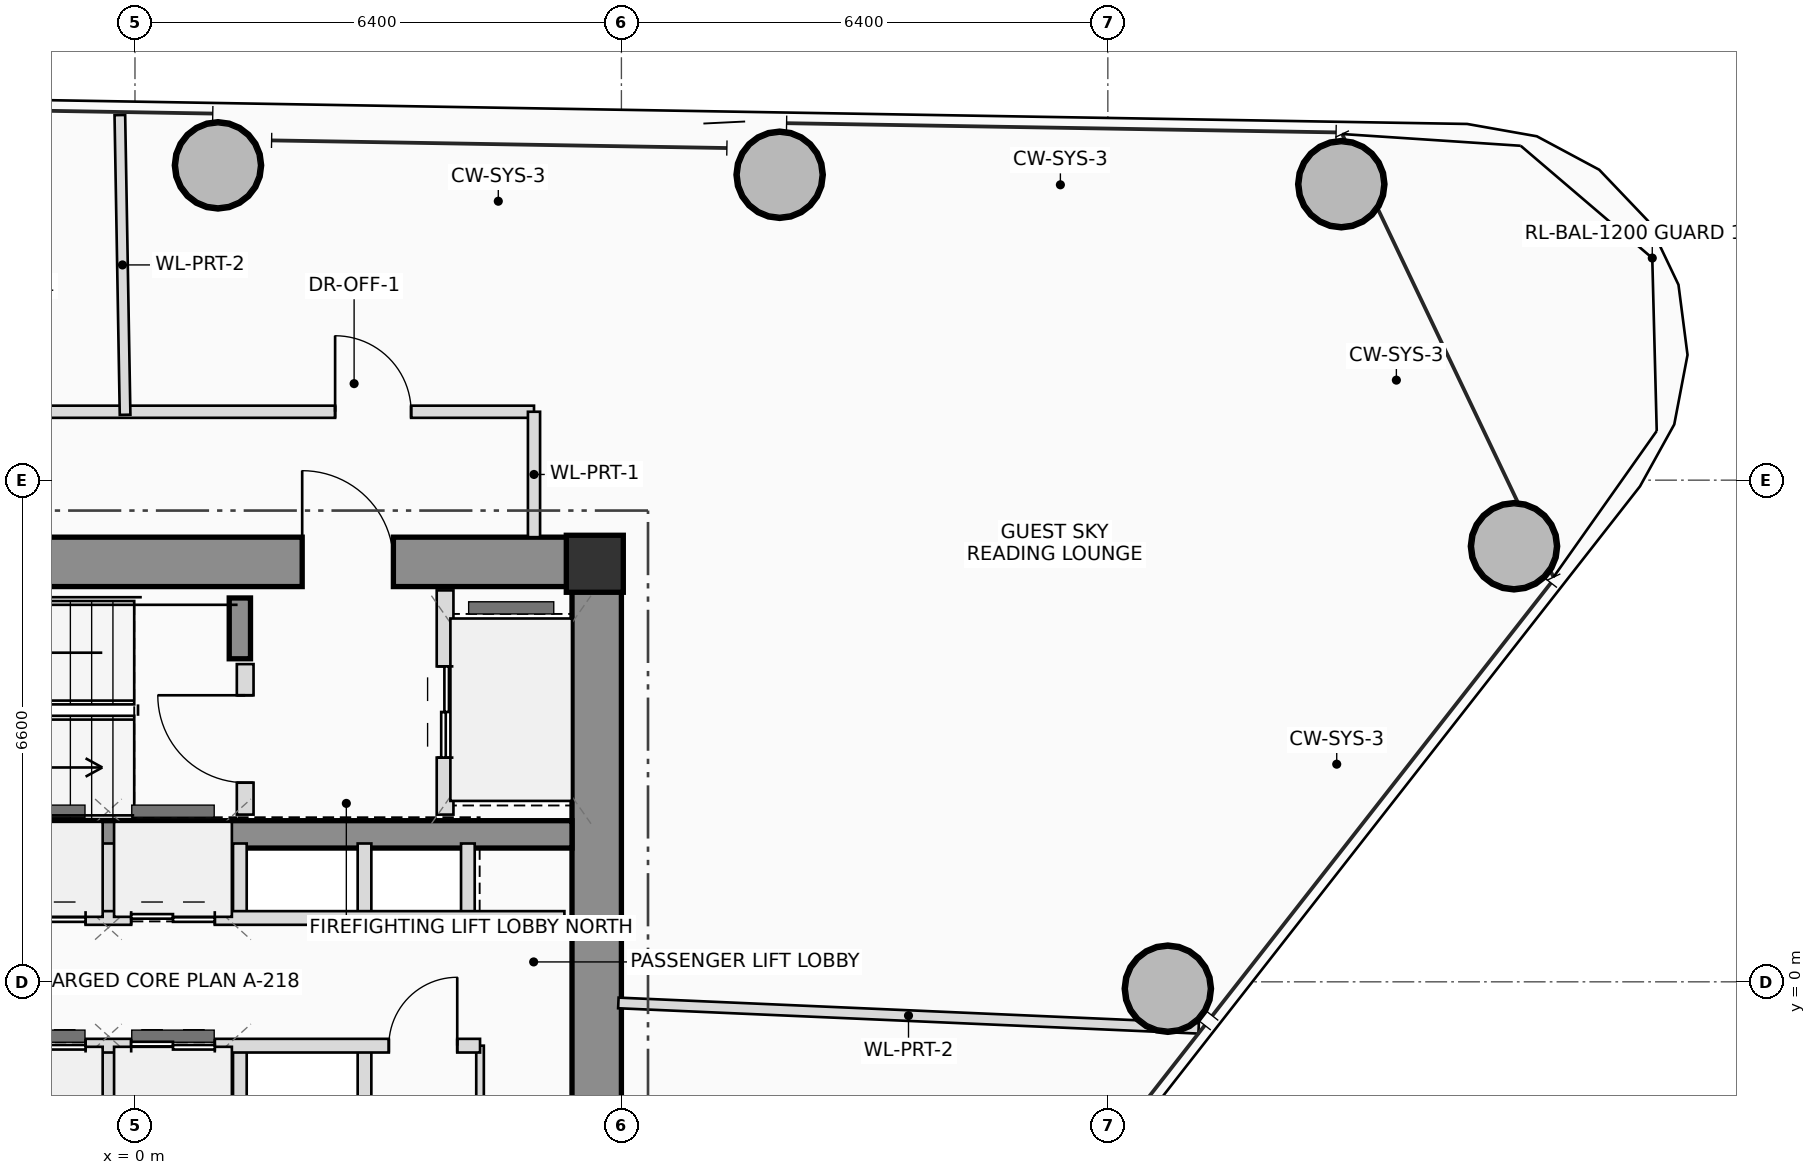
"""IFC4 building model, lengths in metres.
Left out: names, types, materials, properties, quantities, classifications, styles, units other than length and angle.
Written with IfcOpenShell. Run it as: python <this file> out.ifc"""

import sys

from ifc_helpers import new_model, si_unit, direction, frame, frame_2d, origin, origin_2d, place, context, subcontext, project, spatial, rectangle, hollow_circle, extrude, source, transform, mapped, element, fill, save


model = new_model("IFC4")
c1 = context("Model", 3, precision=1e-05, world=origin(), true_north=direction((0.0, 1.0)))
c2 = subcontext(c1, "Body", "Model", "MODEL_VIEW")
j1 = project(units=[si_unit("LENGTHUNIT", "METRE"), si_unit("PLANEANGLEUNIT", "RADIAN")], contexts=[c1])
p1 = place(None, origin())
s1 = spatial("IfcSite", under=j1, at=p1, CompositionType="ELEMENT")
p2 = place(p1, origin())
s2 = spatial("IfcBuilding", under=s1, at=p2, CompositionType="ELEMENT")
p3 = place(p2, frame((0.0, 0.0, 191.45)))
s3 = spatial("IfcBuildingStorey", under=s2, at=p3, CompositionType="ELEMENT", Elevation=191.45)
m1 = source(origin(), c2, "Body", "SweptSolid", [
    extrude(rectangle(XDim=0.75, YDim=0.75, at=origin_2d()), origin(), (0.0, 0.0, 1.0), 3.45),
])
p4 = place(p3, frame((6.05, 5.5, 0.0), z_axis=(0.0, 0.0, 1.0), x_axis=(1.0, 0.0, 0.0)))
e1 = element("IfcColumn", 1, at=p4, inside=s3, PredefinedType="COLUMN", context=c2, shape_type="MappedRepresentation", body=[
    mapped(m1, transform((0.0, 0.0, 0.0), scale=1.0)),
])
p5 = place(p3, frame((-6.4, 5.525, 0.0), z_axis=(0.0, 0.0, 1.0), x_axis=(1.0, 0.0, 0.0)))
e2 = element("IfcWall", 2, at=p5, inside=s3, PredefinedType="SHEAR", context=c2, shape_type="SweptSolid", body=[
    extrude(rectangle(XDim=12.8, YDim=0.65, at=frame_2d((6.4, 0.0))), origin(), (0.0, 0.0, 1.0), 3.45),
])
p6 = place(p5, frame((8.6, 0.0, 0.0)))
e3 = element("IfcOpeningElement", 3, at=p6, cuts=e2, PredefinedType="OPENING", context=c2, shape_type="SweptSolid", body=[
    extrude(rectangle(XDim=1.2, YDim=2.2, at=frame_2d((0.6, 1.1))), frame((0.0, 0.335, 0.0), z_axis=(0.0, -1.0, 0.0), x_axis=(1.0, 0.0, 0.0)), (0.0, 0.0, 1.0), 0.67),
])
p7 = place(p3, frame((6.075, -5.2, 0.0), z_axis=(0.0, 0.0, 1.0), x_axis=(0.0, 1.0, 0.0)))
e4 = element("IfcWall", 4, at=p7, inside=s3, PredefinedType="SHEAR", context=c2, shape_type="SweptSolid", body=[
    extrude(rectangle(XDim=10.4, YDim=0.65, at=frame_2d((5.2, 0.0))), origin(), (0.0, 0.0, 1.0), 3.45),
])
p8 = place(p3, frame((-5.75, 1.94, 0.0), z_axis=(0.0, 0.0, 1.0), x_axis=(1.0, 0.0, 0.0)))
e5 = element("IfcWall", 5, at=p8, inside=s3, PredefinedType="SHEAR", context=c2, shape_type="SweptSolid", body=[
    extrude(rectangle(XDim=11.5, YDim=0.36, at=frame_2d((5.75, 0.0))), origin(), (0.0, 0.0, 1.0), 3.45),
])
p9 = place(p3, frame((1.38, 4.25, 0.0), z_axis=(0.0, 0.0, 1.0), x_axis=(0.0, 1.0, 0.0)))
e6 = element("IfcWall", 6, at=p9, inside=s3, PredefinedType="SHEAR", context=c2, shape_type="SweptSolid", body=[
    extrude(rectangle(XDim=0.8, YDim=0.28, at=frame_2d((0.4, 0.0))), origin(), (0.0, 0.0, 1.0), 3.45),
])
m2 = source(origin(), c2, "Body", "SweptSolid", [
    extrude(hollow_circle(Radius=0.575, WallThickness=0.042, at=origin_2d()), origin(), (0.0, 0.0, 1.0), 3.45),
])
for number, where, z_axis, x_axis in (
    (7, (13.59, -0.09, 0.0), (0.0, 0.0, 1.0), (1.0, 0.0, 0.0)),
    (8, (18.144, 5.731, 0.0), (0.0, 0.0, 1.0), (1.0, 0.0, 0.0)),
    (9, (15.872, 10.494, 0.0), (0.0, 0.0, 1.0), (1.0, 0.0, 0.0)),
    (10, (8.482, 10.618, 0.0), (0.0, 0.0, 1.0), (1.0, 0.0, 0.0)),
    (11, (1.092, 10.742, 0.0), (0.0, 0.0, 1.0), (1.0, 0.0, 0.0)),
):
    element("IfcColumn", number, at=place(p3, frame(where, z_axis=z_axis, x_axis=x_axis)), inside=s3, PredefinedType="COLUMN", context=c2, shape_type="MappedRepresentation", body=[
        mapped(m2, transform((0.0, 0.0, 0.0), scale=1.0)),
    ])
p10 = place(p3, frame((1.45, 2.2, 0.0), z_axis=(0.0, 0.0, 1.0), x_axis=(0.0, 1.0, 0.0)))
e12 = element("IfcWall", 12, at=p10, inside=s3, PredefinedType="PLUMBINGWALL", context=c2, shape_type="SweptSolid", body=[
    extrude(rectangle(XDim=1.98, YDim=0.22, at=frame_2d((0.99, 0.0))), origin(), (0.0, 0.0, 1.0), 3.25),
])
p11 = place(p10, frame((0.42, 0.0, 0.0)))
e13 = element("IfcOpeningElement", 13, at=p11, cuts=e12, PredefinedType="OPENING", context=c2, shape_type="SweptSolid", body=[
    extrude(rectangle(XDim=1.15, YDim=2.15, at=frame_2d((0.575, 1.075))), frame((0.0, 0.12, 0.0), z_axis=(0.0, -1.0, 0.0), x_axis=(1.0, 0.0, 0.0)), (0.0, 0.0, 1.0), 0.24),
])
p12 = place(p3, frame((4.08, 2.2, 0.0), z_axis=(0.0, 0.0, 1.0), x_axis=(0.0, 1.0, 0.0)))
e14 = element("IfcWall", 14, at=p12, inside=s3, PredefinedType="PLUMBINGWALL", context=c2, shape_type="SweptSolid", body=[
    extrude(rectangle(XDim=2.95, YDim=0.22, at=frame_2d((1.475, 0.0))), origin(), (0.0, 0.0, 1.0), 3.25),
])
p13 = place(p12, frame((0.75, 0.0, 0.0)))
e15 = element("IfcOpeningElement", 15, at=p13, cuts=e14, PredefinedType="OPENING", context=c2, shape_type="SweptSolid", body=[
    extrude(rectangle(XDim=1.2, YDim=2.25, at=frame_2d((0.6, 1.125))), frame((0.0, 0.12, 0.0), z_axis=(0.0, -1.0, 0.0), x_axis=(1.0, 0.0, 0.0)), (0.0, 0.0, 1.0), 0.24),
])
for number, where, z_axis, x_axis in (
    (16, (-0.35, 0.84, 0.0), (0.0, 0.0, 1.0), (0.0, 1.0, 0.0)),
    (17, (-0.35, -1.82, 0.0), (0.0, 0.0, 1.0), (0.0, 1.0, 0.0)),
    (18, (1.38, 0.84, 0.0), (0.0, 0.0, 1.0), (0.0, 1.0, 0.0)),
    (19, (1.38, -1.82, 0.0), (0.0, 0.0, 1.0), (0.0, 1.0, 0.0)),
    (20, (3.02, 0.84, 0.0), (0.0, 0.0, 1.0), (0.0, 1.0, 0.0)),
    (21, (4.38, 0.84, 0.0), (0.0, 0.0, 1.0), (0.0, 1.0, 0.0)),
    (22, (3.02, -1.82, 0.0), (0.0, 0.0, 1.0), (0.0, 1.0, 0.0)),
):
    element("IfcWall", number, at=place(p3, frame(where, z_axis=z_axis, x_axis=x_axis)), inside=s3, PredefinedType="PLUMBINGWALL", context=c2, shape_type="SweptSolid", body=[
        extrude(rectangle(XDim=0.98, YDim=0.18, at=frame_2d((0.49, 0.0))), origin(), (0.0, 0.0, 1.0), 3.25),
    ])
p14 = place(p3, frame((4.54, -1.82, 0.0), z_axis=(0.0, 0.0, 1.0), x_axis=(0.0, 1.0, 0.0)))
e23 = element("IfcWall", 23, at=p14, inside=s3, PredefinedType="PARTITIONING", context=c2, shape_type="SweptSolid", body=[
    extrude(rectangle(XDim=0.98, YDim=0.1, at=frame_2d((0.49, 0.0))), origin(), (0.0, 0.0, 1.0), 3.25),
])
p15 = place(p3, frame((-5.68, 0.84, 0.0), z_axis=(0.0, 0.0, 1.0), x_axis=(1.0, 0.0, 0.0)))
e24 = element("IfcWall", 24, at=p15, inside=s3, PredefinedType="PLUMBINGWALL", context=c2, shape_type="SweptSolid", body=[
    extrude(rectangle(XDim=11.33, YDim=0.18, at=frame_2d((5.665, 0.0))), origin(), (0.0, 0.0, 1.0), 3.25),
])
p16 = place(p15, frame((1.38, 0.0, 0.0)))
e25 = element("IfcOpeningElement", 25, at=p16, cuts=e24, PredefinedType="OPENING", context=c2, shape_type="SweptSolid", body=[
    extrude(rectangle(XDim=0.9, YDim=2.05, at=frame_2d((0.45, 1.025))), frame((0.0, 0.1, 0.0), z_axis=(0.0, -1.0, 0.0), x_axis=(1.0, 0.0, 0.0)), (0.0, 0.0, 1.0), 0.2),
])
p17 = place(p15, frame((3.93, 0.0, 0.0)))
e26 = element("IfcOpeningElement", 26, at=p17, cuts=e24, PredefinedType="OPENING", context=c2, shape_type="SweptSolid", body=[
    extrude(rectangle(XDim=1.1, YDim=2.2, at=frame_2d((0.55, 1.1))), frame((0.0, 0.1, 0.0), z_axis=(0.0, -1.0, 0.0), x_axis=(1.0, 0.0, 0.0)), (0.0, 0.0, 1.0), 0.2),
])
p18 = place(p15, frame((5.63, 0.0, 0.0)))
e27 = element("IfcOpeningElement", 27, at=p18, cuts=e24, PredefinedType="OPENING", context=c2, shape_type="SweptSolid", body=[
    extrude(rectangle(XDim=1.1, YDim=2.2, at=frame_2d((0.55, 1.1))), frame((0.0, 0.1, 0.0), z_axis=(0.0, -1.0, 0.0), x_axis=(1.0, 0.0, 0.0)), (0.0, 0.0, 1.0), 0.2),
])
p19 = place(p3, frame((-5.68, -0.84, 0.0), z_axis=(0.0, 0.0, 1.0), x_axis=(1.0, 0.0, 0.0)))
e28 = element("IfcWall", 28, at=p19, inside=s3, PredefinedType="PLUMBINGWALL", context=c2, shape_type="SweptSolid", body=[
    extrude(rectangle(XDim=10.22, YDim=0.18, at=frame_2d((5.11, 0.0))), origin(), (0.0, 0.0, 1.0), 3.25),
])
p20 = place(p19, frame((1.38, 0.0, 0.0)))
e29 = element("IfcOpeningElement", 29, at=p20, cuts=e28, PredefinedType="OPENING", context=c2, shape_type="SweptSolid", body=[
    extrude(rectangle(XDim=0.9, YDim=2.05, at=frame_2d((0.45, 1.025))), frame((0.0, 0.1, 0.0), z_axis=(0.0, -1.0, 0.0), x_axis=(1.0, 0.0, 0.0)), (0.0, 0.0, 1.0), 0.2),
])
p21 = place(p19, frame((3.93, 0.0, 0.0)))
e30 = element("IfcOpeningElement", 30, at=p21, cuts=e28, PredefinedType="OPENING", context=c2, shape_type="SweptSolid", body=[
    extrude(rectangle(XDim=1.1, YDim=2.2, at=frame_2d((0.55, 1.1))), frame((0.0, 0.1, 0.0), z_axis=(0.0, -1.0, 0.0), x_axis=(1.0, 0.0, 0.0)), (0.0, 0.0, 1.0), 0.2),
])
p22 = place(p19, frame((5.63, 0.0, 0.0)))
e31 = element("IfcOpeningElement", 31, at=p22, cuts=e28, PredefinedType="OPENING", context=c2, shape_type="SweptSolid", body=[
    extrude(rectangle(XDim=1.1, YDim=2.2, at=frame_2d((0.55, 1.1))), frame((0.0, 0.1, 0.0), z_axis=(0.0, -1.0, 0.0), x_axis=(1.0, 0.0, 0.0)), (0.0, 0.0, 1.0), 0.2),
])
p23 = place(p19, frame((9.02, 0.0, 0.0)))
e32 = element("IfcOpeningElement", 32, at=p23, cuts=e28, PredefinedType="OPENING", context=c2, shape_type="SweptSolid", body=[
    extrude(rectangle(XDim=0.9, YDim=2.05, at=frame_2d((0.45, 1.025))), frame((0.0, 0.1, 0.0), z_axis=(0.0, -1.0, 0.0), x_axis=(1.0, 0.0, 0.0)), (0.0, 0.0, 1.0), 0.2),
])
p24 = place(p3, frame((-6.36, 7.5, 0.0), z_axis=(0.0, 0.0, 1.0), x_axis=(1.0, 0.0, 0.0)))
e33 = element("IfcWall", 33, at=p24, inside=s3, PredefinedType="PARTITIONING", context=c2, shape_type="SweptSolid", body=[
    extrude(rectangle(XDim=11.61, YDim=0.16, at=frame_2d((5.805, 0.0))), origin(), (0.0, 0.0, 1.0), 2.605),
])
p25 = place(p24, frame((3.948, 0.0, 0.0)))
e34 = element("IfcOpeningElement", 34, at=p25, cuts=e33, PredefinedType="OPENING", context=c2, shape_type="SweptSolid", body=[
    extrude(rectangle(XDim=1.0, YDim=2.25, at=frame_2d((0.5, 1.125))), frame((0.0, 0.09, 0.0), z_axis=(0.0, -1.0, 0.0), x_axis=(1.0, 0.0, 0.0)), (0.0, 0.0, 1.0), 0.18),
])
p26 = place(p24, frame((8.993, 0.0, 0.0)))
e35 = element("IfcOpeningElement", 35, at=p26, cuts=e33, PredefinedType="OPENING", context=c2, shape_type="SweptSolid", body=[
    extrude(rectangle(XDim=1.0, YDim=2.25, at=frame_2d((0.5, 1.125))), frame((0.0, 0.09, 0.0), z_axis=(0.0, -1.0, 0.0), x_axis=(1.0, 0.0, 0.0)), (0.0, 0.0, 1.0), 0.18),
])
p27 = place(p3, frame((5.25, 7.5, 0.0), z_axis=(0.0, 0.0, 1.0), x_axis=(0.0, -1.0, 0.0)))
e36 = element("IfcWall", 36, at=p27, inside=s3, PredefinedType="PARTITIONING", context=c2, shape_type="SweptSolid", body=[
    extrude(rectangle(XDim=1.65, YDim=0.16, at=frame_2d((0.825, 0.0))), origin(), (0.0, 0.0, 1.0), 2.605),
])
p28 = place(p3, frame((6.36, -0.278, 0.0), z_axis=(0.0, 0.0, 1.0), x_axis=(0.999047276506, -0.04364102778, 0.0)))
e37 = element("IfcWall", 37, at=p28, inside=s3, PredefinedType="PARTITIONING", context=c2, shape_type="SweptSolid", body=[
    extrude(rectangle(XDim=7.642, YDim=0.14, at=frame_2d((3.821, 0.0))), origin(), (0.0, 0.0, 1.0), 2.605),
])
p29 = place(p3, frame((-0.13, 7.46, 0.0), z_axis=(0.0, 0.0, 1.0), x_axis=(-0.017456477835, 0.999847624082, 0.0)))
e38 = element("IfcWall", 38, at=p29, inside=s3, PredefinedType="PARTITIONING", context=c2, shape_type="SweptSolid", body=[
    extrude(rectangle(XDim=3.944, YDim=0.14, at=frame_2d((1.972, 0.0))), origin(), (0.0, 0.0, 1.0), 2.765),
])
p30 = place(p6, origin())
e39 = element("IfcDoor", 39, at=p30, inside=s3, OperationType="SINGLE_SWING_LEFT", PredefinedType="DOOR", context=c2, shape_type="SweptSolid", body=[
    extrude(rectangle(XDim=1.2, YDim=2.2, at=frame_2d((0.6, 1.1))), frame((0.0, 0.025, 0.0), z_axis=(0.0, -1.0, 0.0), x_axis=(1.0, 0.0, 0.0)), (0.0, 0.0, 1.0), 0.05),
])
fill(e3, e39)
p31 = place(p11, origin())
e40 = element("IfcDoor", 40, at=p31, inside=s3, OperationType="SINGLE_SWING_RIGHT", PredefinedType="DOOR", context=c2, shape_type="SweptSolid", body=[
    extrude(rectangle(XDim=1.15, YDim=2.15, at=frame_2d((0.575, 1.075))), frame((0.0, 0.025, 0.0), z_axis=(0.0, -1.0, 0.0), x_axis=(1.0, 0.0, 0.0)), (0.0, 0.0, 1.0), 0.05),
])
fill(e13, e40)
p32 = place(p13, origin())
e41 = element("IfcDoor", 41, at=p32, inside=s3, OperationType="DOUBLE_DOOR_SLIDING", PredefinedType="DOOR", context=c2, shape_type="SweptSolid", body=[
    extrude(rectangle(XDim=1.2, YDim=2.25, at=frame_2d((0.6, 1.125))), frame((0.0, 0.025, 0.0), z_axis=(0.0, -1.0, 0.0), x_axis=(1.0, 0.0, 0.0)), (0.0, 0.0, 1.0), 0.05),
])
fill(e15, e41)
p33 = place(p17, origin())
e42 = element("IfcDoor", 42, at=p33, inside=s3, OperationType="DOUBLE_DOOR_SLIDING", PredefinedType="DOOR", context=c2, shape_type="SweptSolid", body=[
    extrude(rectangle(XDim=1.1, YDim=2.2, at=frame_2d((0.55, 1.1))), frame((0.0, 0.025, 0.0), z_axis=(0.0, -1.0, 0.0), x_axis=(1.0, 0.0, 0.0)), (0.0, 0.0, 1.0), 0.05),
])
fill(e26, e42)
p34 = place(p18, origin())
e43 = element("IfcDoor", 43, at=p34, inside=s3, OperationType="DOUBLE_DOOR_SLIDING", PredefinedType="DOOR", context=c2, shape_type="SweptSolid", body=[
    extrude(rectangle(XDim=1.1, YDim=2.2, at=frame_2d((0.55, 1.1))), frame((0.0, 0.025, 0.0), z_axis=(0.0, -1.0, 0.0), x_axis=(1.0, 0.0, 0.0)), (0.0, 0.0, 1.0), 0.05),
])
fill(e27, e43)
p35 = place(p21, origin())
e44 = element("IfcDoor", 44, at=p35, inside=s3, OperationType="DOUBLE_DOOR_SLIDING", PredefinedType="DOOR", context=c2, shape_type="SweptSolid", body=[
    extrude(rectangle(XDim=1.1, YDim=2.2, at=frame_2d((0.55, 1.1))), frame((0.0, 0.025, 0.0), z_axis=(0.0, -1.0, 0.0), x_axis=(1.0, 0.0, 0.0)), (0.0, 0.0, 1.0), 0.05),
])
fill(e30, e44)
p36 = place(p22, origin())
e45 = element("IfcDoor", 45, at=p36, inside=s3, OperationType="DOUBLE_DOOR_SLIDING", PredefinedType="DOOR", context=c2, shape_type="SweptSolid", body=[
    extrude(rectangle(XDim=1.1, YDim=2.2, at=frame_2d((0.55, 1.1))), frame((0.0, 0.025, 0.0), z_axis=(0.0, -1.0, 0.0), x_axis=(1.0, 0.0, 0.0)), (0.0, 0.0, 1.0), 0.05),
])
fill(e31, e45)
p37 = place(p23, origin())
e46 = element("IfcDoor", 46, at=p37, inside=s3, OperationType="SINGLE_SWING_RIGHT", PredefinedType="DOOR", context=c2, shape_type="SweptSolid", body=[
    extrude(rectangle(XDim=0.9, YDim=2.05, at=frame_2d((0.45, 1.025))), frame((0.0, 0.025, 0.0), z_axis=(0.0, -1.0, 0.0), x_axis=(1.0, 0.0, 0.0)), (0.0, 0.0, 1.0), 0.05),
])
fill(e32, e46)
p38 = place(p26, origin())
e47 = element("IfcDoor", 47, at=p38, inside=s3, OperationType="SINGLE_SWING_LEFT", PredefinedType="DOOR", context=c2, shape_type="SweptSolid", body=[
    extrude(rectangle(XDim=1.0, YDim=2.25, at=frame_2d((0.5, 1.125))), frame((0.0, 0.025, 0.0), z_axis=(0.0, -1.0, 0.0), x_axis=(1.0, 0.0, 0.0)), (0.0, 0.0, 1.0), 0.05),
])
fill(e35, e47)
save(model, sys.argv[1])
